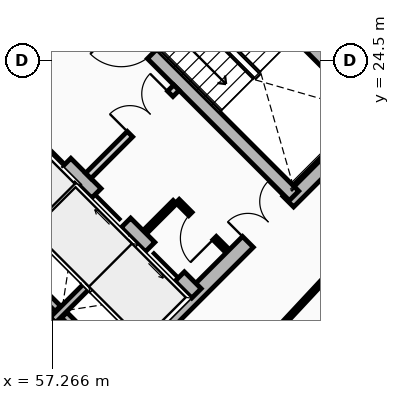
"""IFC4 building model, lengths in metres.
Left out: names, types, materials, properties, quantities, classifications, styles, units other than length and angle.
Written with IfcOpenShell. Run it as: python <this file> out.ifc"""

import sys

from ifc_helpers import new_model, si_unit, direction, frame, frame_2d, origin, place, context, subcontext, project, spatial, rectangle, extrude, source, transform, mapped, element, fill, save


model = new_model("IFC4")
c1 = context("Model", 3, precision=1e-05, world=origin(), true_north=direction((0.0, 1.0)))
c2 = subcontext(c1, "Body", "Model", "MODEL_VIEW")
j1 = project(units=[si_unit("LENGTHUNIT", "METRE"), si_unit("PLANEANGLEUNIT", "RADIAN")], contexts=[c1])
p1 = place(None, origin())
s1 = spatial("IfcSite", under=j1, at=p1, CompositionType="ELEMENT")
p2 = place(p1, origin())
s2 = spatial("IfcBuilding", under=s1, at=p2, CompositionType="ELEMENT")
p3 = place(p2, frame((0.0, 0.0, 199.57)))
s3 = spatial("IfcBuildingStorey", under=s2, at=p3, CompositionType="ELEMENT", Elevation=199.57)
for number, where, z_axis, x_axis in (
    (1, (58.702, 15.732, 0.0), (0.0, 0.0, 1.0), (-0.707, 0.707, 0.0)),
    (2, (66.268, 23.298, 0.0), (0.0, 0.0, 1.0), (-0.707, 0.707, 0.0)),
):
    element("IfcWall", number, at=place(p3, frame(where, z_axis=z_axis, x_axis=x_axis)), inside=s3, PredefinedType="SHEAR", context=c2, shape_type="SweptSolid", body=[
        extrude(rectangle(XDim=14.1, YDim=0.4, at=frame_2d((7.05, 0.0))), origin(), (0.0, 0.0, 1.0), 2.91),
    ])
p4 = place(p3, frame((58.561, 15.873, 0.0), z_axis=(0.0, 0.0, 1.0), x_axis=(0.707106781187, 0.707106781187, 0.0)))
e3 = element("IfcWall", 3, at=p4, inside=s3, PredefinedType="SHEAR", context=c2, shape_type="SweptSolid", body=[
    extrude(rectangle(XDim=10.7, YDim=0.4, at=frame_2d((5.35, 0.0))), origin(), (0.0, 0.0, 1.0), 2.91),
])
m1 = source(origin(), c2, "Body", "SweptSolid", [
    extrude(rectangle(XDim=1.5, YDim=2.02, at=frame_2d((0.75, 1.01))), frame((0.0, 0.21, 0.0), z_axis=(0.0, -1.0, 0.0), x_axis=(1.0, 0.0, 0.0)), (0.0, 0.0, 1.0), 0.42),
])
p5 = place(p4, frame((5.45, 0.0, 0.0)))
e4 = element("IfcOpeningElement", 4, at=p5, cuts=e3, PredefinedType="OPENING", context=c2, shape_type="MappedRepresentation", body=[
    mapped(m1, transform((0.0, 0.0, 0.0), x_axis=(1.0, 0.0, 0.0), y_axis=(0.0, 1.0, 0.0), z_axis=(0.0, 0.0, 1.0), scale=1.0)),
])
p6 = place(p3, frame((61.06, 18.373, 0.0), z_axis=(0.0, 0.0, 1.0), x_axis=(-0.707106781187, 0.707106781187, 0.0)))
e5 = element("IfcWall", 5, at=p6, inside=s3, PredefinedType="SHEAR", context=c2, shape_type="SweptSolid", body=[
    extrude(rectangle(XDim=13.7, YDim=0.35, at=frame_2d((6.85, 0.0))), origin(), (0.0, 0.0, 1.0), 2.91),
])
m2 = source(origin(), c2, "Body", "SweptSolid", [
    extrude(rectangle(XDim=1.1, YDim=2.015, at=frame_2d((0.55, 1.007))), frame((0.0, 0.185, 0.0), z_axis=(0.0, -1.0, 0.0), x_axis=(1.0, 0.0, 0.0)), (0.0, 0.0, 1.0), 0.37),
])
p7 = place(p6, frame((4.85, 0.0, 0.0)))
e6 = element("IfcOpeningElement", 6, at=p7, cuts=e5, PredefinedType="OPENING", context=c2, shape_type="MappedRepresentation", body=[
    mapped(m2, transform((0.0, 0.0, 0.0), x_axis=(1.0, 0.0, 0.0), y_axis=(0.0, 1.0, 0.0), z_axis=(0.0, 0.0, 1.0), scale=1.0)),
])
p8 = place(p6, frame((0.625, 0.0, 0.0)))
e7 = element("IfcOpeningElement", 7, at=p8, cuts=e5, PredefinedType="OPENING", context=c2, shape_type="MappedRepresentation", body=[
    mapped(m2, transform((0.0, 0.0, 0.0), x_axis=(1.0, 0.0, 0.0), y_axis=(0.0, 1.0, 0.0), z_axis=(0.0, 0.0, 1.0), scale=1.0)),
])
p9 = place(p6, frame((2.625, 0.0, 0.0)))
e8 = element("IfcOpeningElement", 8, at=p9, cuts=e5, PredefinedType="OPENING", context=c2, shape_type="MappedRepresentation", body=[
    mapped(m2, transform((0.0, 0.0, 0.0), x_axis=(1.0, 0.0, 0.0), y_axis=(0.0, 1.0, 0.0), z_axis=(0.0, 0.0, 1.0), scale=1.0)),
])
m3 = source(origin(), c2, "Body", "SweptSolid", [
    extrude(rectangle(XDim=1.15, YDim=2.02, at=frame_2d((0.575, 1.01))), frame((0.0, 0.185, 0.0), z_axis=(0.0, -1.0, 0.0), x_axis=(1.0, 0.0, 0.0)), (0.0, 0.0, 1.0), 0.37),
])
p10 = place(p6, frame((7.27, 0.0, 0.0)))
e9 = element("IfcOpeningElement", 9, at=p10, cuts=e5, PredefinedType="OPENING", context=c2, shape_type="MappedRepresentation", body=[
    mapped(m3, transform((0.0, 0.0, 0.0), x_axis=(1.0, 0.0, 0.0), y_axis=(0.0, 1.0, 0.0), z_axis=(0.0, 0.0, 1.0), scale=1.0)),
])
p11 = place(p3, frame((63.627, 20.94, 0.0), z_axis=(0.0, 0.0, 1.0), x_axis=(-0.707119496762, 0.707094065383, 0.0)))
e10 = element("IfcWall", 10, at=p11, inside=s3, PredefinedType="SHEAR", context=c2, shape_type="SweptSolid", body=[
    extrude(rectangle(XDim=9.6, YDim=0.35, at=frame_2d((4.8, 0.0))), origin(), (0.0, 0.0, 1.0), 2.91),
])
p12 = place(p11, frame((5.28, 0.0, 0.0)))
e11 = element("IfcOpeningElement", 11, at=p12, cuts=e10, PredefinedType="OPENING", context=c2, shape_type="MappedRepresentation", body=[
    mapped(m3, transform((0.0, 0.0, 0.0), x_axis=(1.0, 0.0, 0.0), y_axis=(0.0, 1.0, 0.0), z_axis=(0.0, 0.0, 1.0), scale=1.0)),
])
p13 = place(p3, frame((65.812, 23.125, 0.0), z_axis=(0.0, 0.0, 1.0), x_axis=(-0.707106781187, 0.707106781187, 0.0)))
e12 = element("IfcWall", 12, at=p13, inside=s3, PredefinedType="SHEAR", context=c2, shape_type="SweptSolid", body=[
    extrude(rectangle(XDim=6.695, YDim=0.35, at=frame_2d((3.348, 0.0))), origin(), (0.0, 0.0, 1.0), 2.91),
])
p14 = place(p3, frame((55.888, 19.069, 0.0), z_axis=(0.0, 0.0, 1.0), x_axis=(0.707106781187, 0.707106781187, 0.0)))
e13 = element("IfcWall", 13, at=p14, inside=s3, PredefinedType="SHEAR", context=c2, shape_type="SweptSolid", body=[
    extrude(rectangle(XDim=2.97, YDim=0.2, at=frame_2d((1.485, 0.0))), origin(), (0.0, 0.0, 1.0), 2.91),
])
p15 = place(p3, frame((57.284, 17.673, 0.0), z_axis=(0.0, 0.0, 1.0), x_axis=(0.707147878904, 0.70706568108, 0.0)))
e14 = element("IfcWall", 14, at=p15, inside=s3, PredefinedType="SHEAR", context=c2, shape_type="SweptSolid", body=[
    extrude(rectangle(XDim=2.97, YDim=0.2, at=frame_2d((1.485, 0.0))), origin(), (0.0, 0.0, 1.0), 2.91),
])
p16 = place(p3, frame((57.412, 17.97, 0.0), z_axis=(0.0, 0.0, 1.0), x_axis=(-0.707106781187, 0.707106781187, 0.0)))
e15 = element("IfcWall", 15, at=p16, inside=s3, PredefinedType="SHEAR", context=c2, shape_type="SweptSolid", body=[
    extrude(rectangle(XDim=1.735, YDim=0.2, at=frame_2d((0.867, 0.0))), origin(), (0.0, 0.0, 1.0), 2.91),
])
p17 = place(p3, frame((58.737, 16.644, 0.0), z_axis=(0.0, 0.0, 1.0), x_axis=(-0.707032117043, 0.707181437447, 0.0)))
e16 = element("IfcWall", 16, at=p17, inside=s3, PredefinedType="SHEAR", context=c2, shape_type="SweptSolid", body=[
    extrude(rectangle(XDim=1.635, YDim=0.2, at=frame_2d((0.817, 0.0))), origin(), (0.0, 0.0, 1.0), 2.91),
])
p18 = place(p3, frame((58.214, 21.467, 0.0), z_axis=(0.0, 0.0, 1.0), x_axis=(0.707106781187, 0.707106781187, 0.0)))
e17 = element("IfcWall", 17, at=p18, inside=s3, PredefinedType="PARTITIONING", context=c2, shape_type="SweptSolid", body=[
    extrude(rectangle(XDim=3.28, YDim=0.2, at=frame_2d((1.64, 0.0))), origin(), (0.0, 0.0, 1.0), 2.685),
])
m4 = source(origin(), c2, "Body", "SweptSolid", [
    extrude(rectangle(XDim=1.5, YDim=2.02, at=frame_2d((0.75, 1.01))), frame((0.0, 0.11, 0.0), z_axis=(0.0, -1.0, 0.0), x_axis=(1.0, 0.0, 0.0)), (0.0, 0.0, 1.0), 0.22),
])
p19 = place(p18, frame((1.55, 0.0, 0.0)))
e18 = element("IfcOpeningElement", 18, at=p19, cuts=e17, PredefinedType="OPENING", context=c2, shape_type="MappedRepresentation", body=[
    mapped(m4, transform((0.0, 0.0, 0.0), x_axis=(1.0, 0.0, 0.0), y_axis=(0.0, 1.0, 0.0), z_axis=(0.0, 0.0, 1.0), scale=1.0)),
])
p20 = place(p3, frame((54.961, 24.719, 0.0), z_axis=(0.0, 0.0, 1.0), x_axis=(0.707106781187, 0.707106781187, 0.0)))
e19 = element("IfcWall", 19, at=p20, inside=s3, PredefinedType="PARTITIONING", context=c2, shape_type="SweptSolid", body=[
    extrude(rectangle(XDim=3.28, YDim=0.2, at=frame_2d((1.64, 0.0))), origin(), (0.0, 0.0, 1.0), 2.685),
])
m5 = source(origin(), c2, "Body", "SweptSolid", [
    extrude(rectangle(XDim=0.9, YDim=2.005, at=frame_2d((0.45, 1.002))), frame((0.0, 0.11, 0.0), z_axis=(0.0, -1.0, 0.0), x_axis=(1.0, 0.0, 0.0)), (0.0, 0.0, 1.0), 0.22),
])
p21 = place(p20, frame((0.16, 0.0, 0.0)))
e20 = element("IfcOpeningElement", 20, at=p21, cuts=e19, PredefinedType="OPENING", context=c2, shape_type="MappedRepresentation", body=[
    mapped(m5, transform((0.0, 0.0, 0.0), x_axis=(1.0, 0.0, 0.0), y_axis=(0.0, 1.0, 0.0), z_axis=(0.0, 0.0, 1.0), scale=1.0)),
])
p22 = place(p3, frame((61.835, 19.529, 0.0), z_axis=(0.0, 0.0, 1.0), x_axis=(-0.707174592913, 0.707038962956, 0.0)))
e21 = element("IfcWall", 21, at=p22, inside=s3, PredefinedType="PARTITIONING", context=c2, shape_type="SweptSolid", body=[
    extrude(rectangle(XDim=1.8, YDim=0.125, at=frame_2d((0.9, 0.0))), origin(), (0.0, 0.0, 1.0), 2.685),
])
m6 = source(origin(), c2, "Body", "SweptSolid", [
    extrude(rectangle(XDim=0.9, YDim=2.005, at=frame_2d((0.45, 1.002))), frame((0.0, 0.073, 0.0), z_axis=(0.0, -1.0, 0.0), x_axis=(1.0, 0.0, 0.0)), (0.0, 0.0, 1.0), 0.145),
])
p23 = place(p22, frame((0.42, 0.0, 0.0)))
e22 = element("IfcOpeningElement", 22, at=p23, cuts=e21, PredefinedType="OPENING", context=c2, shape_type="MappedRepresentation", body=[
    mapped(m6, transform((0.0, 0.0, 0.0), x_axis=(1.0, 0.0, 0.0), y_axis=(0.0, 1.0, 0.0), z_axis=(0.0, 0.0, 1.0), scale=1.0)),
])
p24 = place(p3, frame((59.713, 19.996, 0.0), z_axis=(0.0, 0.0, 1.0), x_axis=(0.707217726, 0.706995818963, 0.0)))
e23 = element("IfcWall", 23, at=p24, inside=s3, PredefinedType="PARTITIONING", context=c2, shape_type="SweptSolid", body=[
    extrude(rectangle(XDim=1.1, YDim=0.125, at=frame_2d((0.55, 0.0))), origin(), (0.0, 0.0, 1.0), 2.685),
])
p25 = place(p3, frame((62.736, 16.924, 0.0), z_axis=(0.0, 0.0, 1.0), x_axis=(0.681946700833, 0.731401871219, 0.0)))
e24 = element("IfcWall", 24, at=p25, inside=s3, PredefinedType="MOVABLE", context=c2, shape_type="SweptSolid", body=[
    extrude(rectangle(XDim=6.393, YDim=0.1, at=frame_2d((3.196, 0.0))), origin(), (0.0, 0.0, 1.0), 2.255),
])
m7 = source(origin(), c2, "Body", "SweptSolid", [
    extrude(rectangle(XDim=1.1, YDim=2.015, at=frame_2d((0.55, 1.007))), frame((0.0, 0.025, 0.0), z_axis=(0.0, -1.0, 0.0), x_axis=(1.0, 0.0, 0.0)), (0.0, 0.0, 1.0), 0.05),
])
p26 = place(p7, origin())
e25 = element("IfcDoor", 25, at=p26, inside=s3, OperationType="SLIDING_TO_LEFT", PredefinedType="DOOR", context=c2, shape_type="MappedRepresentation", body=[
    mapped(m7, transform((0.0, 0.0, 0.0), x_axis=(1.0, 0.0, 0.0), y_axis=(0.0, 1.0, 0.0), z_axis=(0.0, 0.0, 1.0), scale=1.0)),
])
fill(e6, e25)
p27 = place(p8, origin())
e26 = element("IfcDoor", 26, at=p27, inside=s3, OperationType="SLIDING_TO_LEFT", PredefinedType="DOOR", context=c2, shape_type="MappedRepresentation", body=[
    mapped(m7, transform((0.0, 0.0, 0.0), x_axis=(1.0, 0.0, 0.0), y_axis=(0.0, 1.0, 0.0), z_axis=(0.0, 0.0, 1.0), scale=1.0)),
])
fill(e7, e26)
p28 = place(p9, origin())
e27 = element("IfcDoor", 27, at=p28, inside=s3, OperationType="SLIDING_TO_RIGHT", PredefinedType="DOOR", context=c2, shape_type="MappedRepresentation", body=[
    mapped(m7, transform((0.0, 0.0, 0.0), x_axis=(1.0, 0.0, 0.0), y_axis=(0.0, 1.0, 0.0), z_axis=(0.0, 0.0, 1.0), scale=1.0)),
])
fill(e8, e27)
m8 = source(origin(), c2, "Body", "SweptSolid", [
    extrude(rectangle(XDim=1.15, YDim=2.02, at=frame_2d((0.575, 1.01))), frame((0.0, 0.025, 0.0), z_axis=(0.0, -1.0, 0.0), x_axis=(1.0, 0.0, 0.0)), (0.0, 0.0, 1.0), 0.05),
])
p29 = place(p12, origin())
e28 = element("IfcDoor", 28, at=p29, inside=s3, OperationType="SINGLE_SWING_RIGHT", PredefinedType="DOOR", context=c2, shape_type="MappedRepresentation", body=[
    mapped(m8, transform((0.0, 0.0, 0.0), x_axis=(1.0, 0.0, 0.0), y_axis=(0.0, 1.0, 0.0), z_axis=(0.0, 0.0, 1.0), scale=1.0)),
])
fill(e11, e28)
m9 = source(origin(), c2, "Body", "SweptSolid", [
    extrude(rectangle(XDim=1.5, YDim=2.02, at=frame_2d((0.75, 1.01))), frame((0.0, 0.025, 0.0), z_axis=(0.0, -1.0, 0.0), x_axis=(1.0, 0.0, 0.0)), (0.0, 0.0, 1.0), 0.05),
])
p30 = place(p5, origin())
e29 = element("IfcDoor", 29, at=p30, inside=s3, OperationType="DOUBLE_DOOR_SINGLE_SWING", PredefinedType="DOOR", context=c2, shape_type="MappedRepresentation", body=[
    mapped(m9, transform((0.0, 0.0, 0.0), x_axis=(1.0, 0.0, 0.0), y_axis=(0.0, 1.0, 0.0), z_axis=(0.0, 0.0, 1.0), scale=1.0)),
])
fill(e4, e29)
p31 = place(p19, origin())
e30 = element("IfcDoor", 30, at=p31, inside=s3, OperationType="DOUBLE_DOOR_SINGLE_SWING", PredefinedType="DOOR", context=c2, shape_type="MappedRepresentation", body=[
    mapped(m9, transform((0.0, 0.0, 0.0), x_axis=(1.0, 0.0, 0.0), y_axis=(0.0, 1.0, 0.0), z_axis=(0.0, 0.0, 1.0), scale=1.0)),
])
fill(e18, e30)
m10 = source(origin(), c2, "Body", "SweptSolid", [
    extrude(rectangle(XDim=0.9, YDim=2.005, at=frame_2d((0.45, 1.002))), frame((0.0, 0.025, 0.0), z_axis=(0.0, -1.0, 0.0), x_axis=(1.0, 0.0, 0.0)), (0.0, 0.0, 1.0), 0.05),
])
p32 = place(p23, origin())
e31 = element("IfcDoor", 31, at=p32, inside=s3, OperationType="SINGLE_SWING_LEFT", PredefinedType="DOOR", context=c2, shape_type="MappedRepresentation", body=[
    mapped(m10, transform((0.0, 0.0, 0.0), x_axis=(1.0, 0.0, 0.0), y_axis=(0.0, 1.0, 0.0), z_axis=(0.0, 0.0, 1.0), scale=1.0)),
])
fill(e22, e31)
save(model, sys.argv[1])
